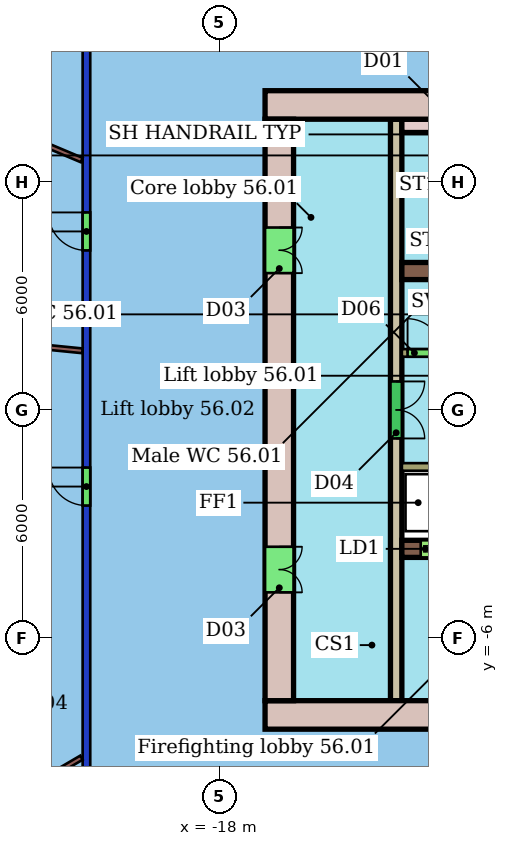
"""IFC4 building model, lengths in metres.
Left out: names, types, materials, properties, quantities, classifications, styles, units other than length and angle.
Written with IfcOpenShell. Run it as: python <this file> out.ifc"""

import sys

from ifc_helpers import new_model, si_unit, direction, frame, frame_2d, origin, place, context, subcontext, project, spatial, rectangle, extrude, element, fill, save


model = new_model("IFC4")
c1 = context("Model", 3, precision=1e-05, world=origin(), true_north=direction((0.0, 1.0)))
c2 = subcontext(c1, "Body", "Model", "MODEL_VIEW")
j1 = project(units=[si_unit("LENGTHUNIT", "METRE"), si_unit("PLANEANGLEUNIT", "RADIAN")], contexts=[c1])
p1 = place(None, origin())
s1 = spatial("IfcSite", under=j1, at=p1, CompositionType="ELEMENT")
p2 = place(p1, origin())
s2 = spatial("IfcBuilding", under=s1, at=p2, CompositionType="ELEMENT")
p3 = place(p2, frame((0.0, 0.0, 228.1)))
s3 = spatial("IfcBuildingStorey", under=s2, at=p3, CompositionType="ELEMENT", Elevation=228.1)
p4 = place(p3, frame((-21.5, -10.4, 0.0), z_axis=(0.0, 0.0, 1.0), x_axis=(0.0, 1.0, 0.0)))
e1 = element("IfcWall", 1, at=p4, inside=s3, PredefinedType="PARTITIONING", context=c2, shape_type="SweptSolid", body=[
    extrude(rectangle(XDim=20.8, YDim=0.2, at=frame_2d((10.4, 0.0))), origin(), (0.0, 0.0, 1.0), 3.05),
])
p5 = place(p4, frame((14.597, 0.0, 0.0)))
e2 = element("IfcOpeningElement", 2, at=p5, cuts=e1, PredefinedType="OPENING", context=c2, shape_type="SweptSolid", body=[
    extrude(rectangle(XDim=1.0, YDim=2.4, at=frame_2d((0.5, 1.2))), frame((0.0, 0.11, 0.0), z_axis=(0.0, -1.0, 0.0), x_axis=(1.0, 0.0, 0.0)), (0.0, 0.0, 1.0), 0.22),
])
p6 = place(p4, frame((7.884, 0.0, 0.0)))
e3 = element("IfcOpeningElement", 3, at=p6, cuts=e1, PredefinedType="OPENING", context=c2, shape_type="SweptSolid", body=[
    extrude(rectangle(XDim=1.0, YDim=2.4, at=frame_2d((0.5, 1.2))), frame((0.0, 0.11, 0.0), z_axis=(0.0, -1.0, 0.0), x_axis=(1.0, 0.0, 0.0)), (0.0, 0.0, 1.0), 0.22),
])
p7 = place(p3, frame((-26.344, 8.562, 0.0), z_axis=(0.0, 0.0, 1.0), x_axis=(0.921707152803, -0.387886484002, 0.0)))
e4 = element("IfcWall", 4, at=p7, inside=s3, PredefinedType="PARTITIONING", context=c2, shape_type="SweptSolid", body=[
    extrude(rectangle(XDim=5.121, YDim=0.125, at=frame_2d((2.561, 0.0))), origin(), (0.0, 0.0, 1.0), 3.45),
])
p8 = place(p3, frame((-28.918, 2.284, 0.0), z_axis=(0.0, 0.0, 1.0), x_axis=(0.995066424933, -0.099210936754, 0.0)))
e5 = element("IfcWall", 5, at=p8, inside=s3, PredefinedType="PARTITIONING", context=c2, shape_type="SweptSolid", body=[
    extrude(rectangle(XDim=7.348, YDim=0.125, at=frame_2d((3.674, 0.0))), origin(), (0.0, 0.0, 1.0), 3.45),
])
p9 = place(p3, frame((-28.382, -13.102, 0.0), z_axis=(0.0, 0.0, 1.0), x_axis=(0.863003515908, 0.505197913229, 0.0)))
e6 = element("IfcWall", 6, at=p9, inside=s3, PredefinedType="PARTITIONING", context=c2, shape_type="SweptSolid", body=[
    extrude(rectangle(XDim=7.822, YDim=0.125, at=frame_2d((3.911, 0.0))), origin(), (0.0, 0.0, 1.0), 3.45),
])
p10 = place(p3, frame((-6.0, 8.025, 0.0), z_axis=(0.0, 0.0, 1.0), x_axis=(-1.0, 0.0, 0.0)))
e7 = element("IfcWall", 7, at=p10, inside=s3, PredefinedType="SHEAR", context=c2, shape_type="SweptSolid", body=[
    extrude(rectangle(XDim=10.8, YDim=0.75, at=frame_2d((5.4, 0.0))), origin(), (0.0, 0.0, 1.0), 3.3),
])
p11 = place(p10, frame((5.2, 0.0, 0.0)))
e8 = element("IfcOpeningElement", 8, at=p11, cuts=e7, PredefinedType="OPENING", context=c2, shape_type="SweptSolid", body=[
    extrude(rectangle(XDim=1.2, YDim=2.1, at=frame_2d((0.6, 1.05))), frame((0.0, 0.385, 0.0), z_axis=(0.0, -1.0, 0.0), x_axis=(1.0, 0.0, 0.0)), (0.0, 0.0, 1.0), 0.77),
])
p12 = place(p3, frame((-16.8, -8.025, 0.0), z_axis=(0.0, 0.0, 1.0), x_axis=(1.0, 0.0, 0.0)))
e9 = element("IfcWall", 9, at=p12, inside=s3, PredefinedType="SHEAR", context=c2, shape_type="SweptSolid", body=[
    extrude(rectangle(XDim=21.6, YDim=0.75, at=frame_2d((10.8, 0.0))), origin(), (0.0, 0.0, 1.0), 3.3),
])
p13 = place(p12, frame((4.8, 0.0, 0.0)))
e10 = element("IfcOpeningElement", 10, at=p13, cuts=e9, PredefinedType="OPENING", context=c2, shape_type="SweptSolid", body=[
    extrude(rectangle(XDim=1.2, YDim=2.1, at=frame_2d((0.6, 1.05))), frame((0.0, 0.385, 0.0), z_axis=(0.0, -1.0, 0.0), x_axis=(1.0, 0.0, 0.0)), (0.0, 0.0, 1.0), 0.77),
])
p14 = place(p3, frame((-16.425, 7.65, 0.0), z_axis=(0.0, 0.0, 1.0), x_axis=(0.0, -1.0, 0.0)))
e11 = element("IfcWall", 11, at=p14, inside=s3, PredefinedType="SHEAR", context=c2, shape_type="SweptSolid", body=[
    extrude(rectangle(XDim=15.3, YDim=0.75, at=frame_2d((7.65, 0.0))), origin(), (0.0, 0.0, 1.0), 3.3),
])
p15 = place(p14, frame((11.25, 0.0, 0.0)))
e12 = element("IfcOpeningElement", 12, at=p15, cuts=e11, PredefinedType="OPENING", context=c2, shape_type="SweptSolid", body=[
    extrude(rectangle(XDim=1.2, YDim=2.1, at=frame_2d((0.6, 1.05))), frame((0.0, 0.385, 0.0), z_axis=(0.0, -1.0, 0.0), x_axis=(1.0, 0.0, 0.0)), (0.0, 0.0, 1.0), 0.77),
])
p16 = place(p14, frame((2.85, 0.0, 0.0)))
e13 = element("IfcOpeningElement", 13, at=p16, cuts=e11, PredefinedType="OPENING", context=c2, shape_type="SweptSolid", body=[
    extrude(rectangle(XDim=1.2, YDim=2.1, at=frame_2d((0.6, 1.05))), frame((0.0, 0.385, 0.0), z_axis=(0.0, -1.0, 0.0), x_axis=(1.0, 0.0, 0.0)), (0.0, 0.0, 1.0), 0.77),
])
p17 = place(p3, frame((-13.2, 3.655, 0.0), z_axis=(0.0, 0.0, 1.0), x_axis=(1.0, 0.0, 0.0)))
e14 = element("IfcWall", 14, at=p17, inside=s3, PredefinedType="SHEAR", context=c2, shape_type="SweptSolid", body=[
    extrude(rectangle(XDim=7.2, YDim=0.45, at=frame_2d((3.6, 0.0))), origin(), (0.0, 0.0, 1.0), 3.3),
])
p18 = place(p3, frame((-13.2, -3.655, 0.0), z_axis=(0.0, 0.0, 1.0), x_axis=(1.0, 0.0, 0.0)))
e15 = element("IfcWall", 15, at=p18, inside=s3, PredefinedType="SHEAR", context=c2, shape_type="SweptSolid", body=[
    extrude(rectangle(XDim=7.2, YDim=0.45, at=frame_2d((3.6, 0.0))), origin(), (0.0, 0.0, 1.0), 3.3),
])
p19 = place(p18, frame((0.496, 0.0, 0.0)))
e16 = element("IfcOpeningElement", 16, at=p19, cuts=e15, PredefinedType="OPENING", context=c2, shape_type="SweptSolid", body=[
    extrude(rectangle(XDim=1.2, YDim=2.1, at=frame_2d((0.6, 1.05))), frame((0.0, 0.235, 0.0), z_axis=(0.0, -1.0, 0.0), x_axis=(1.0, 0.0, 0.0)), (0.0, 0.0, 1.0), 0.47),
])
p20 = place(p18, frame((2.938, 0.0, 0.0)))
e17 = element("IfcOpeningElement", 17, at=p20, cuts=e15, PredefinedType="OPENING", context=c2, shape_type="SweptSolid", body=[
    extrude(rectangle(XDim=1.2, YDim=2.1, at=frame_2d((0.6, 1.05))), frame((0.0, 0.235, 0.0), z_axis=(0.0, -1.0, 0.0), x_axis=(1.0, 0.0, 0.0)), (0.0, 0.0, 1.0), 0.47),
])
p21 = place(p3, frame((-13.35, 7.65, 0.0), z_axis=(0.0, 0.0, 1.0), x_axis=(0.0, -1.0, 0.0)))
e18 = element("IfcWall", 18, at=p21, inside=s3, PredefinedType="SHEAR", context=c2, shape_type="SweptSolid", body=[
    extrude(rectangle(XDim=15.3, YDim=0.3, at=frame_2d((7.65, 0.0))), origin(), (0.0, 0.0, 1.0), 3.3),
])
p22 = place(p21, frame((6.9, 0.0, 0.0)))
e19 = element("IfcOpeningElement", 19, at=p22, cuts=e18, PredefinedType="OPENING", context=c2, shape_type="SweptSolid", body=[
    extrude(rectangle(XDim=1.5, YDim=2.1, at=frame_2d((0.75, 1.05))), frame((0.0, 0.16, 0.0), z_axis=(0.0, -1.0, 0.0), x_axis=(1.0, 0.0, 0.0)), (0.0, 0.0, 1.0), 0.32),
])
p23 = place(p3, frame((-13.2, 1.5, 0.0), z_axis=(0.0, 0.0, 1.0), x_axis=(1.0, 0.0, 0.0)))
e20 = element("IfcWall", 20, at=p23, inside=s3, PredefinedType="SHEAR", context=c2, shape_type="SweptSolid", body=[
    extrude(rectangle(XDim=14.4, YDim=0.2, at=frame_2d((7.2, 0.0))), origin(), (0.0, 0.0, 1.0), 3.3),
])
p24 = place(p23, frame((10.312, 0.0, 0.0)))
e21 = element("IfcOpeningElement", 21, at=p24, cuts=e20, PredefinedType="OPENING", context=c2, shape_type="SweptSolid", body=[
    extrude(rectangle(XDim=1.1, YDim=2.1, at=frame_2d((0.55, 1.05))), frame((0.0, 0.11, 0.0), z_axis=(0.0, -1.0, 0.0), x_axis=(1.0, 0.0, 0.0)), (0.0, 0.0, 1.0), 0.22),
])
p25 = place(p23, frame((12.754, 0.0, 0.0)))
e22 = element("IfcOpeningElement", 22, at=p25, cuts=e20, PredefinedType="OPENING", context=c2, shape_type="SweptSolid", body=[
    extrude(rectangle(XDim=1.1, YDim=2.1, at=frame_2d((0.55, 1.05))), frame((0.0, 0.11, 0.0), z_axis=(0.0, -1.0, 0.0), x_axis=(1.0, 0.0, 0.0)), (0.0, 0.0, 1.0), 0.22),
])
p26 = place(p23, frame((0.15, 0.0, 0.0)))
e23 = element("IfcOpeningElement", 23, at=p26, cuts=e20, PredefinedType="OPENING", context=c2, shape_type="SweptSolid", body=[
    extrude(rectangle(XDim=0.9, YDim=2.1, at=frame_2d((0.45, 1.05))), frame((0.0, 0.11, 0.0), z_axis=(0.0, -1.0, 0.0), x_axis=(1.0, 0.0, 0.0)), (0.0, 0.0, 1.0), 0.22),
])
p27 = place(p23, frame((3.365, 0.0, 0.0)))
e24 = element("IfcOpeningElement", 24, at=p27, cuts=e20, PredefinedType="OPENING", context=c2, shape_type="SweptSolid", body=[
    extrude(rectangle(XDim=1.0, YDim=2.1, at=frame_2d((0.5, 1.05))), frame((0.0, 0.11, 0.0), z_axis=(0.0, -1.0, 0.0), x_axis=(1.0, 0.0, 0.0)), (0.0, 0.0, 1.0), 0.22),
])
p28 = place(p23, frame((8.467, 0.0, 0.0)))
e25 = element("IfcOpeningElement", 25, at=p28, cuts=e20, PredefinedType="OPENING", context=c2, shape_type="SweptSolid", body=[
    extrude(rectangle(XDim=0.9, YDim=2.1, at=frame_2d((0.45, 1.05))), frame((0.0, 0.11, 0.0), z_axis=(0.0, -1.0, 0.0), x_axis=(1.0, 0.0, 0.0)), (0.0, 0.0, 1.0), 0.22),
])
p29 = place(p3, frame((1.2, -1.5, 0.0), z_axis=(0.0, 0.0, 1.0), x_axis=(-1.0, 0.0, 0.0)))
e26 = element("IfcWall", 26, at=p29, inside=s3, PredefinedType="SHEAR", context=c2, shape_type="SweptSolid", body=[
    extrude(rectangle(XDim=14.4, YDim=0.2, at=frame_2d((7.2, 0.0))), origin(), (0.0, 0.0, 1.0), 3.3),
])
p30 = place(p29, frame((7.821, 0.0, 0.0)))
e27 = element("IfcOpeningElement", 27, at=p30, cuts=e26, PredefinedType="OPENING", context=c2, shape_type="SweptSolid", body=[
    extrude(rectangle(XDim=1.2, YDim=2.1, at=frame_2d((0.6, 1.05))), frame((0.0, 0.11, 0.0), z_axis=(0.0, -1.0, 0.0), x_axis=(1.0, 0.0, 0.0)), (0.0, 0.0, 1.0), 0.22),
])
p31 = place(p29, frame((0.546, 0.0, 0.0)))
e28 = element("IfcOpeningElement", 28, at=p31, cuts=e26, PredefinedType="OPENING", context=c2, shape_type="SweptSolid", body=[
    extrude(rectangle(XDim=1.1, YDim=2.1, at=frame_2d((0.55, 1.05))), frame((0.0, 0.11, 0.0), z_axis=(0.0, -1.0, 0.0), x_axis=(1.0, 0.0, 0.0)), (0.0, 0.0, 1.0), 0.22),
])
p32 = place(p29, frame((4.335, 0.0, 0.0)))
e29 = element("IfcOpeningElement", 29, at=p32, cuts=e26, PredefinedType="OPENING", context=c2, shape_type="SweptSolid", body=[
    extrude(rectangle(XDim=1.0, YDim=2.1, at=frame_2d((0.5, 1.05))), frame((0.0, 0.11, 0.0), z_axis=(0.0, -1.0, 0.0), x_axis=(1.0, 0.0, 0.0)), (0.0, 0.0, 1.0), 0.22),
])
p33 = place(p29, frame((2.592, 0.0, 0.0)))
e30 = element("IfcOpeningElement", 30, at=p33, cuts=e26, PredefinedType="OPENING", context=c2, shape_type="SweptSolid", body=[
    extrude(rectangle(XDim=1.0, YDim=2.1, at=frame_2d((0.5, 1.05))), frame((0.0, 0.11, 0.0), z_axis=(0.0, -1.0, 0.0), x_axis=(1.0, 0.0, 0.0)), (0.0, 0.0, 1.0), 0.22),
])
p34 = place(p3, frame((-13.2, 7.475, 0.0), z_axis=(0.0, 0.0, 1.0), x_axis=(1.0, 0.0, 0.0)))
e31 = element("IfcWall", 31, at=p34, inside=s3, PredefinedType="SHEAR", context=c2, shape_type="SweptSolid", body=[
    extrude(rectangle(XDim=0.8, YDim=0.35, at=frame_2d((0.4, 0.0))), origin(), (0.0, 0.0, 1.0), 3.3),
])
p35 = place(p5, origin())
e32 = element("IfcDoor", 32, at=p35, inside=s3, OperationType="SINGLE_SWING_RIGHT", PredefinedType="DOOR", context=c2, shape_type="SweptSolid", body=[
    extrude(rectangle(XDim=1.0, YDim=2.4, at=frame_2d((0.5, 1.2))), frame((0.0, 0.025, 0.0), z_axis=(0.0, -1.0, 0.0), x_axis=(1.0, 0.0, 0.0)), (0.0, 0.0, 1.0), 0.05),
])
fill(e2, e32)
p36 = place(p6, origin())
e33 = element("IfcDoor", 33, at=p36, inside=s3, OperationType="SINGLE_SWING_RIGHT", PredefinedType="DOOR", context=c2, shape_type="SweptSolid", body=[
    extrude(rectangle(XDim=1.0, YDim=2.4, at=frame_2d((0.5, 1.2))), frame((0.0, 0.025, 0.0), z_axis=(0.0, -1.0, 0.0), x_axis=(1.0, 0.0, 0.0)), (0.0, 0.0, 1.0), 0.05),
])
fill(e3, e33)
p37 = place(p15, origin())
e34 = element("IfcDoor", 34, at=p37, inside=s3, OperationType="DOUBLE_DOOR_SINGLE_SWING", PredefinedType="NOTDEFINED", context=c2, shape_type="SweptSolid", body=[
    extrude(rectangle(XDim=1.2, YDim=2.1, at=frame_2d((0.6, 1.05))), frame((0.0, 0.025, 0.0), z_axis=(0.0, -1.0, 0.0), x_axis=(1.0, 0.0, 0.0)), (0.0, 0.0, 1.0), 0.05),
])
fill(e12, e34)
p38 = place(p16, origin())
e35 = element("IfcDoor", 35, at=p38, inside=s3, OperationType="DOUBLE_DOOR_SINGLE_SWING", PredefinedType="NOTDEFINED", context=c2, shape_type="SweptSolid", body=[
    extrude(rectangle(XDim=1.2, YDim=2.1, at=frame_2d((0.6, 1.05))), frame((0.0, 0.025, 0.0), z_axis=(0.0, -1.0, 0.0), x_axis=(1.0, 0.0, 0.0)), (0.0, 0.0, 1.0), 0.05),
])
fill(e13, e35)
p39 = place(p19, origin())
e36 = element("IfcDoor", 36, at=p39, inside=s3, OperationType="DOUBLE_DOOR_SLIDING", PredefinedType="NOTDEFINED", context=c2, shape_type="SweptSolid", body=[
    extrude(rectangle(XDim=1.2, YDim=2.1, at=frame_2d((0.6, 1.05))), frame((0.0, 0.025, 0.0), z_axis=(0.0, -1.0, 0.0), x_axis=(1.0, 0.0, 0.0)), (0.0, 0.0, 1.0), 0.05),
])
fill(e16, e36)
p40 = place(p22, origin())
e37 = element("IfcDoor", 37, at=p40, inside=s3, OperationType="DOUBLE_DOOR_SINGLE_SWING", PredefinedType="NOTDEFINED", context=c2, shape_type="SweptSolid", body=[
    extrude(rectangle(XDim=1.5, YDim=2.1, at=frame_2d((0.75, 1.05))), frame((0.0, 0.025, 0.0), z_axis=(0.0, -1.0, 0.0), x_axis=(1.0, 0.0, 0.0)), (0.0, 0.0, 1.0), 0.05),
])
fill(e19, e37)
p41 = place(p26, origin())
e38 = element("IfcDoor", 38, at=p41, inside=s3, OperationType="SINGLE_SWING_LEFT", PredefinedType="NOTDEFINED", context=c2, shape_type="SweptSolid", body=[
    extrude(rectangle(XDim=0.9, YDim=2.1, at=frame_2d((0.45, 1.05))), frame((0.0, 0.025, 0.0), z_axis=(0.0, -1.0, 0.0), x_axis=(1.0, 0.0, 0.0)), (0.0, 0.0, 1.0), 0.05),
])
fill(e23, e38)
save(model, sys.argv[1])
